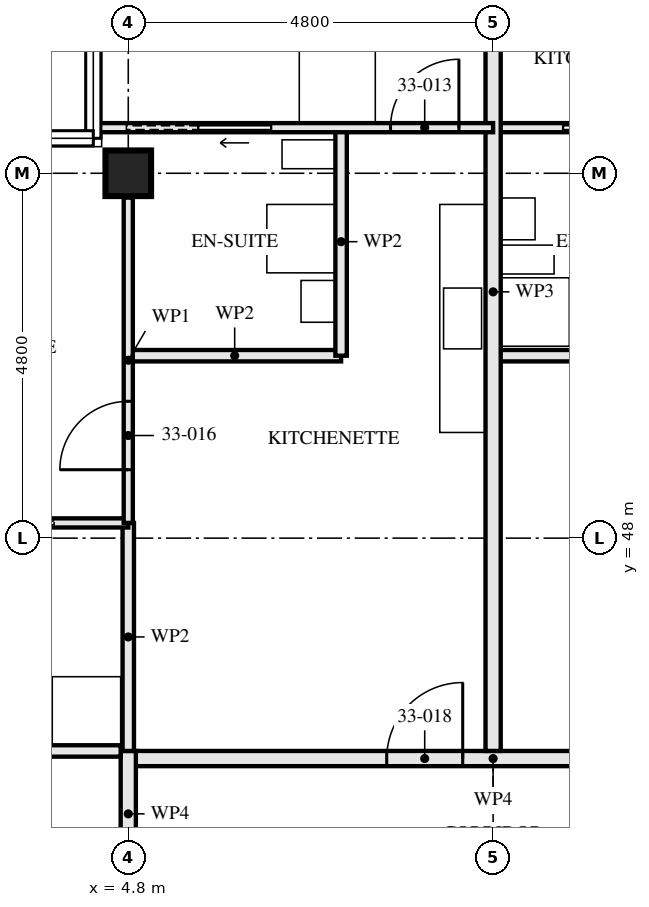
"""IFC4 building model, lengths in metres.
Left out: names, types, materials, properties, quantities, classifications, styles, units other than length and angle.
Written with IfcOpenShell. Run it as: python <this file> out.ifc"""

import sys

from ifc_helpers import new_model, si_unit, direction, frame, frame_2d, origin, origin_2d, place, context, subcontext, project, spatial, rectangle, hollow_rectangle, extrude, element, fill, save


model = new_model("IFC4")
c1 = context("Model", 3, precision=1e-05, world=origin(), true_north=direction((0.0, 1.0)))
c2 = subcontext(c1, "Body", "Model", "MODEL_VIEW")
j1 = project(units=[si_unit("LENGTHUNIT", "METRE"), si_unit("PLANEANGLEUNIT", "RADIAN")], contexts=[c1])
p1 = place(None, origin())
s1 = spatial("IfcSite", under=j1, at=p1, CompositionType="ELEMENT")
p2 = place(p1, origin())
s2 = spatial("IfcBuilding", under=s1, at=p2, CompositionType="ELEMENT")
p3 = place(p2, frame((0.0, 0.0, 122.5)))
s3 = spatial("IfcBuildingStorey", under=s2, at=p3, CompositionType="ELEMENT", Elevation=122.5)
p4 = place(p3, frame((4.8, 52.8, 0.0), z_axis=(0.0, 0.0, 1.0), x_axis=(0.0, 1.0, 0.0)))
e1 = element("IfcColumn", 1, at=p4, inside=s3, PredefinedType="COLUMN", context=c2, shape_type="SweptSolid", body=[
    extrude(hollow_rectangle(XDim=0.6, YDim=0.6, WallThickness=0.08, at=origin_2d()), origin(), (0.0, 0.0, 1.0), 3.5),
])
p5 = place(p3, frame((12.4, 50.4, 0.0), z_axis=(0.0, 0.0, 1.0), x_axis=(-1.0, 0.0, 0.0)))
e2 = element("IfcWall", 2, at=p5, inside=s3, PredefinedType="PARTITIONING", context=c2, shape_type="SweptSolid", body=[
    extrude(rectangle(XDim=2.8, YDim=0.15, at=frame_2d((1.4, 0.0))), origin(), (0.0, 0.0, 1.0), 3.33),
])
p6 = place(p3, frame((14.4, 53.4, 0.0), z_axis=(0.0, 0.0, 1.0), x_axis=(-1.0, 0.0, 0.0)))
e3 = element("IfcWall", 3, at=p6, inside=s3, PredefinedType="PARTITIONING", context=c2, shape_type="SweptSolid", body=[
    extrude(rectangle(XDim=4.8, YDim=0.12, at=frame_2d((2.4, 0.0))), origin(), (0.0, 0.0, 1.0), 3.33),
])
p7 = place(p6, frame((0.925, 0.0, 0.0)))
e4 = element("IfcOpeningElement", 4, at=p7, cuts=e3, PredefinedType="OPENING", context=c2, shape_type="SweptSolid", body=[
    extrude(rectangle(XDim=0.9, YDim=2.1, at=frame_2d((0.45, 1.05))), frame((0.0, 0.071, 0.0), z_axis=(0.0, -1.0, 0.0), x_axis=(1.0, 0.0, 0.0)), (0.0, 0.0, 1.0), 0.141),
])
p8 = place(p6, frame((2.925, 0.0, 0.0)))
e5 = element("IfcOpeningElement", 5, at=p8, cuts=e3, PredefinedType="OPENING", context=c2, shape_type="SweptSolid", body=[
    extrude(rectangle(XDim=0.95, YDim=2.1, at=frame_2d((0.475, 1.05))), frame((0.0, 0.071, 0.0), z_axis=(0.0, -1.0, 0.0), x_axis=(1.0, 0.0, 0.0)), (0.0, 0.0, 1.0), 0.141),
])
p9 = place(p3, frame((9.6, 57.28, 0.0), z_axis=(0.0, 0.0, 1.0), x_axis=(0.0, -1.0, 0.0)))
e6 = element("IfcWall", 6, at=p9, inside=s3, PredefinedType="PARTITIONING", context=c2, shape_type="SweptSolid", body=[
    extrude(rectangle(XDim=12.08, YDim=0.2, at=frame_2d((6.04, 0.0))), origin(), (0.0, 0.0, 1.0), 2.55),
])
p10 = place(p3, frame((7.6, 53.4, 0.0), z_axis=(0.0, 0.0, 1.0), x_axis=(0.0, -1.0, 0.0)))
e7 = element("IfcWall", 7, at=p10, inside=s3, PredefinedType="PARTITIONING", context=c2, shape_type="SweptSolid", body=[
    extrude(rectangle(XDim=3.0, YDim=0.15, at=frame_2d((1.5, 0.0))), origin(), (0.0, 0.0, 1.0), 2.55),
])
p11 = place(p3, frame((7.6, 50.4, 0.0), z_axis=(0.0, 0.0, 1.0), x_axis=(-1.0, 0.0, 0.0)))
e8 = element("IfcWall", 8, at=p11, inside=s3, PredefinedType="PARTITIONING", context=c2, shape_type="SweptSolid", body=[
    extrude(rectangle(XDim=2.8, YDim=0.15, at=frame_2d((1.4, 0.0))), origin(), (0.0, 0.0, 1.0), 3.33),
])
p12 = place(p3, frame((4.8, 48.2, 0.0), z_axis=(0.0, 0.0, 1.0), x_axis=(0.0, -1.0, 0.0)))
e9 = element("IfcWall", 9, at=p12, inside=s3, PredefinedType="PARTITIONING", context=c2, shape_type="SweptSolid", body=[
    extrude(rectangle(XDim=3.0, YDim=0.15, at=frame_2d((1.5, 0.0))), origin(), (0.0, 0.0, 1.0), 2.55),
])
p13 = place(p3, frame((9.6, 53.4, 0.0), z_axis=(0.0, 0.0, 1.0), x_axis=(-1.0, 0.0, 0.0)))
e10 = element("IfcWall", 10, at=p13, inside=s3, PredefinedType="PARTITIONING", context=c2, shape_type="SweptSolid", body=[
    extrude(rectangle(XDim=5.24, YDim=0.12, at=frame_2d((2.62, 0.0))), origin(), (0.0, 0.0, 1.0), 2.32),
])
p14 = place(p13, frame((0.45, 0.0, 0.0)))
e11 = element("IfcOpeningElement", 11, at=p14, cuts=e10, PredefinedType="OPENING", context=c2, shape_type="SweptSolid", body=[
    extrude(rectangle(XDim=0.9, YDim=2.1, at=frame_2d((0.45, 1.05))), frame((0.0, 0.071, 0.0), z_axis=(0.0, -1.0, 0.0), x_axis=(1.0, 0.0, 0.0)), (0.0, 0.0, 1.0), 0.141),
])
p15 = place(p13, frame((2.925, 0.0, 0.0)))
e12 = element("IfcOpeningElement", 12, at=p15, cuts=e10, PredefinedType="OPENING", context=c2, shape_type="SweptSolid", body=[
    extrude(rectangle(XDim=0.95, YDim=2.1, at=frame_2d((0.475, 1.05))), frame((0.0, 0.071, 0.0), z_axis=(0.0, -1.0, 0.0), x_axis=(1.0, 0.0, 0.0)), (0.0, 0.0, 1.0), 0.141),
])
p16 = place(p3, frame((4.8, 48.2, 0.0), z_axis=(0.0, 0.0, 1.0), x_axis=(-1.0, 0.0, 0.0)))
e13 = element("IfcWall", 13, at=p16, inside=s3, PredefinedType="PARTITIONING", context=c2, shape_type="SweptSolid", body=[
    extrude(rectangle(XDim=4.48, YDim=0.12, at=frame_2d((2.24, 0.0))), origin(), (0.0, 0.0, 1.0), 3.33),
])
p17 = place(p16, frame((1.925, 0.0, 0.0)))
e14 = element("IfcOpeningElement", 14, at=p17, cuts=e13, PredefinedType="OPENING", context=c2, shape_type="SweptSolid", body=[
    extrude(rectangle(XDim=0.95, YDim=2.1, at=frame_2d((0.475, 1.05))), frame((0.0, 0.071, 0.0), z_axis=(0.0, -1.0, 0.0), x_axis=(1.0, 0.0, 0.0)), (0.0, 0.0, 1.0), 0.141),
])
p18 = place(p3, frame((4.8, 52.48, 0.0), z_axis=(0.0, 0.0, 1.0), x_axis=(0.0, -1.0, 0.0)))
e15 = element("IfcWall", 15, at=p18, inside=s3, PredefinedType="PARTITIONING", context=c2, shape_type="SweptSolid", body=[
    extrude(rectangle(XDim=4.28, YDim=0.12, at=frame_2d((2.14, 0.0))), origin(), (0.0, 0.0, 1.0), 3.33),
])
p19 = place(p18, frame((2.68, 0.0, 0.0)))
e16 = element("IfcOpeningElement", 16, at=p19, cuts=e15, PredefinedType="OPENING", context=c2, shape_type="SweptSolid", body=[
    extrude(rectangle(XDim=0.9, YDim=2.1, at=frame_2d((0.45, 1.05))), frame((0.0, 0.071, 0.0), z_axis=(0.0, -1.0, 0.0), x_axis=(1.0, 0.0, 0.0)), (0.0, 0.0, 1.0), 0.141),
])
p20 = place(p3, frame((14.4, 45.1, 0.0), z_axis=(0.0, 0.0, 1.0), x_axis=(-1.0, 0.0, 0.0)))
e17 = element("IfcWall", 17, at=p20, inside=s3, PredefinedType="PARTITIONING", context=c2, shape_type="SweptSolid", body=[
    extrude(rectangle(XDim=9.6, YDim=0.2, at=frame_2d((4.8, 0.0))), origin(), (0.0, 0.0, 1.0), 3.33),
])
p21 = place(p20, frame((0.4, 0.0, 0.0)))
e18 = element("IfcOpeningElement", 18, at=p21, cuts=e17, PredefinedType="OPENING", context=c2, shape_type="SweptSolid", body=[
    extrude(rectangle(XDim=1.0, YDim=2.1, at=frame_2d((0.5, 1.05))), frame((0.0, 0.111, 0.0), z_axis=(0.0, -1.0, 0.0), x_axis=(1.0, 0.0, 0.0)), (0.0, 0.0, 1.0), 0.221),
])
p22 = place(p20, frame((5.2, 0.0, 0.0)))
e19 = element("IfcOpeningElement", 19, at=p22, cuts=e17, PredefinedType="OPENING", context=c2, shape_type="SweptSolid", body=[
    extrude(rectangle(XDim=1.0, YDim=2.1, at=frame_2d((0.5, 1.05))), frame((0.0, 0.111, 0.0), z_axis=(0.0, -1.0, 0.0), x_axis=(1.0, 0.0, 0.0)), (0.0, 0.0, 1.0), 0.221),
])
p23 = place(p3, frame((4.8, 45.2, 0.0), z_axis=(0.0, 0.0, 1.0), x_axis=(0.0, -1.0, 0.0)))
e20 = element("IfcWall", 20, at=p23, inside=s3, PredefinedType="PARTITIONING", context=c2, shape_type="SweptSolid", body=[
    extrude(rectangle(XDim=1.655, YDim=0.2, at=frame_2d((0.828, 0.0))), origin(), (0.0, 0.0, 1.0), 3.33),
])
p24 = place(p3, frame((4.7, 45.2, 0.0), z_axis=(0.0, 0.0, 1.0), x_axis=(-1.0, 0.0, 0.0)))
e21 = element("IfcWall", 21, at=p24, inside=s3, PredefinedType="PARTITIONING", context=c2, shape_type="SweptSolid", body=[
    extrude(rectangle(XDim=5.14, YDim=0.15, at=frame_2d((2.57, 0.0))), origin(), (0.0, 0.0, 1.0), 2.32),
])
p25 = place(p8, origin())
e22 = element("IfcDoor", 22, at=p25, inside=s3, OperationType="SLIDING_TO_RIGHT", PredefinedType="DOOR", context=c2, shape_type="SweptSolid", body=[
    extrude(rectangle(XDim=0.95, YDim=2.1, at=frame_2d((0.475, 1.05))), frame((0.0, 0.022, 0.0), z_axis=(0.0, -1.0, 0.0), x_axis=(1.0, 0.0, 0.0)), (0.0, 0.0, 1.0), 0.044),
])
fill(e5, e22)
p26 = place(p14, frame((0.9, 0.0, 0.0), z_axis=(0.0, 0.0, 1.0), x_axis=(-1.0, 0.0, 0.0)))
e23 = element("IfcDoor", 23, at=p26, inside=s3, OperationType="SINGLE_SWING_LEFT", PredefinedType="DOOR", context=c2, shape_type="SweptSolid", body=[
    extrude(rectangle(XDim=0.9, YDim=2.1, at=frame_2d((0.45, 1.05))), frame((0.0, 0.022, 0.0), z_axis=(0.0, -1.0, 0.0), x_axis=(1.0, 0.0, 0.0)), (0.0, 0.0, 1.0), 0.044),
])
fill(e11, e23)
p27 = place(p15, origin())
e24 = element("IfcDoor", 24, at=p27, inside=s3, OperationType="SLIDING_TO_LEFT", PredefinedType="DOOR", context=c2, shape_type="SweptSolid", body=[
    extrude(rectangle(XDim=0.95, YDim=2.1, at=frame_2d((0.475, 1.05))), frame((0.0, 0.022, 0.0), z_axis=(0.0, -1.0, 0.0), x_axis=(1.0, 0.0, 0.0)), (0.0, 0.0, 1.0), 0.044),
])
fill(e12, e24)
p28 = place(p19, frame((0.9, 0.0, 0.0), z_axis=(0.0, 0.0, 1.0), x_axis=(-1.0, 0.0, 0.0)))
e25 = element("IfcDoor", 25, at=p28, inside=s3, OperationType="SINGLE_SWING_RIGHT", PredefinedType="DOOR", context=c2, shape_type="SweptSolid", body=[
    extrude(rectangle(XDim=0.9, YDim=2.1, at=frame_2d((0.45, 1.05))), frame((0.0, 0.022, 0.0), z_axis=(0.0, -1.0, 0.0), x_axis=(1.0, 0.0, 0.0)), (0.0, 0.0, 1.0), 0.044),
])
fill(e16, e25)
p29 = place(p22, frame((1.0, 0.0, 0.0), z_axis=(0.0, 0.0, 1.0), x_axis=(-1.0, 0.0, 0.0)))
e26 = element("IfcDoor", 26, at=p29, inside=s3, OperationType="SINGLE_SWING_LEFT", PredefinedType="DOOR", context=c2, shape_type="SweptSolid", body=[
    extrude(rectangle(XDim=1.0, YDim=2.1, at=frame_2d((0.5, 1.05))), frame((0.0, 0.027, 0.0), z_axis=(0.0, -1.0, 0.0), x_axis=(1.0, 0.0, 0.0)), (0.0, 0.0, 1.0), 0.054),
])
fill(e19, e26)
save(model, sys.argv[1])
